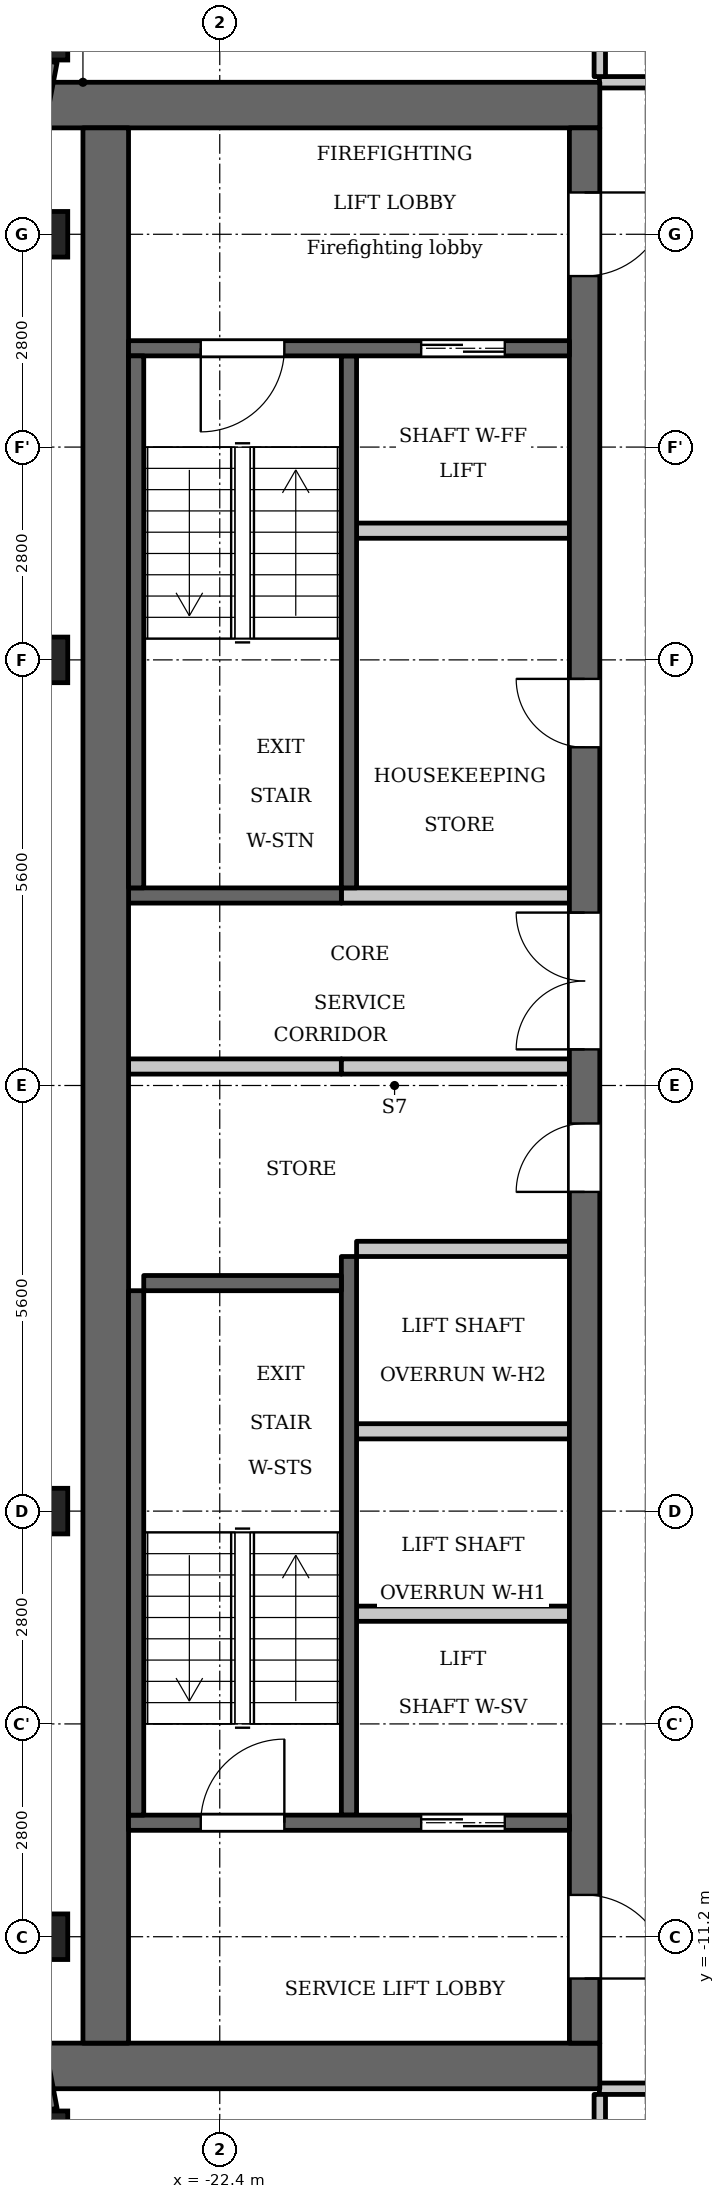
"""IFC4 building model, lengths in metres.
Left out: names, types, materials, properties, quantities, classifications, styles, units other than length and angle.
Written with IfcOpenShell. Run it as: python <this file> out.ifc"""

import sys

from ifc_helpers import new_model, si_unit, direction, frame, frame_2d, origin, origin_2d, place, context, subcontext, project, spatial, rectangle, extrude, element, fill, save


model = new_model("IFC4")
c1 = context("Model", 3, precision=1e-05, world=origin(), true_north=direction((0.0, 1.0)))
c2 = subcontext(c1, "Body", "Model", "MODEL_VIEW")
j1 = project(units=[si_unit("LENGTHUNIT", "METRE"), si_unit("PLANEANGLEUNIT", "RADIAN")], contexts=[c1])
p1 = place(None, origin())
s1 = spatial("IfcSite", under=j1, at=p1, CompositionType="ELEMENT")
p2 = place(p1, origin())
s2 = spatial("IfcBuilding", under=s1, at=p2, CompositionType="ELEMENT")
p3 = place(p2, frame((0.0, 0.0, 299.9)))
s3 = spatial("IfcBuildingStorey", under=s2, at=p3, CompositionType="ELEMENT", Elevation=299.9)
for number, where, z_axis, x_axis in (
    (1, (-24.7, -13.793, 0.0), (0.0, 0.0, 1.0), (1.0, 0.0, 0.0)),
    (2, (-24.7, -11.2, 0.0), (0.0, 0.0, 1.0), (1.0, 0.0, 0.0)),
    (3, (-24.7, -5.6, 0.0), (0.0, 0.0, 1.0), (1.0, 0.0, 0.0)),
    (4, (-24.7, 5.6, 0.0), (0.0, 0.0, 1.0), (1.0, 0.0, 0.0)),
    (5, (-24.7, 11.2, 0.0), (0.0, 0.0, 1.0), (1.0, 0.0, 0.0)),
    (6, (-24.7, 13.793, 0.0), (0.0, 0.0, 1.0), (1.0, 0.0, 0.0)),
):
    element("IfcColumn", number, at=place(p3, frame(where, z_axis=z_axis, x_axis=x_axis)), inside=s3, PredefinedType="COLUMN", context=c2, shape_type="SweptSolid", body=[
        extrude(rectangle(XDim=0.6, YDim=0.6, at=origin_2d()), origin(), (0.0, 0.0, 1.0), 3.5),
    ])
for number, where, z_axis, x_axis in (
    (7, (-24.688, 13.485, 0.0), (0.0, 0.0, 1.0), (-0.187, -0.982, 0.0)),
    (8, (-25.052, -11.573, 0.0), (0.0, 0.0, 1.0), (0.187, -0.982, 0.0)),
):
    element("IfcWall", number, at=place(p3, frame(where, z_axis=z_axis, x_axis=x_axis)), inside=s3, PredefinedType="SOLIDWALL", context=c2, shape_type="SweptSolid", body=[
        extrude(rectangle(XDim=1.947, YDim=0.3, at=frame_2d((0.973, 0.0))), origin(), (0.0, 0.0, 1.0), 2.6),
    ])
p4 = place(p3, frame((-20.7, 2.6, 0.0), z_axis=(0.0, 0.0, 1.0), x_axis=(0.0, 1.0, 0.0)))
e9 = element("IfcWall", 9, at=p4, inside=s3, PredefinedType="SHEAR", context=c2, shape_type="SweptSolid", body=[
    extrude(rectangle(XDim=7.0, YDim=0.2, at=frame_2d((3.5, 0.0))), origin(), (0.0, 0.0, 1.0), 3.2),
])
p5 = place(p3, frame((-20.7, -9.6, 0.0), z_axis=(0.0, 0.0, 1.0), x_axis=(0.0, 1.0, 0.0)))
e10 = element("IfcWall", 10, at=p5, inside=s3, PredefinedType="SHEAR", context=c2, shape_type="SweptSolid", body=[
    extrude(rectangle(XDim=7.35, YDim=0.2, at=frame_2d((3.675, 0.0))), origin(), (0.0, 0.0, 1.0), 3.2),
])
p6 = place(p3, frame((-20.8, 2.5, 0.0), z_axis=(0.0, 0.0, 1.0), x_axis=(-1.0, 0.0, 0.0)))
e11 = element("IfcWall", 11, at=p6, inside=s3, PredefinedType="SHEAR", context=c2, shape_type="SweptSolid", body=[
    extrude(rectangle(XDim=2.8, YDim=0.2, at=frame_2d((1.4, 0.0))), origin(), (0.0, 0.0, 1.0), 3.2),
])
p7 = place(p3, frame((-20.8, 0.25, 0.0), z_axis=(0.0, 0.0, 1.0), x_axis=(-1.0, 0.0, 0.0)))
e12 = element("IfcWall", 12, at=p7, inside=s3, PredefinedType="PARTITIONING", context=c2, shape_type="SweptSolid", body=[
    extrude(rectangle(XDim=2.8, YDim=0.2, at=frame_2d((1.4, 0.0))), origin(), (0.0, 0.0, 1.0), 3.2),
])
for number, where, z_axis, x_axis in (
    (13, (-17.4, 12.9, 0.0), (0.0, 0.0, 1.0), (-1.0, 0.0, 0.0)),
    (14, (-17.4, -12.9, 0.0), (0.0, 0.0, 1.0), (-1.0, 0.0, 0.0)),
):
    element("IfcWall", number, at=place(p3, frame(where, z_axis=z_axis, x_axis=x_axis)), inside=s3, PredefinedType="SHEAR", context=c2, shape_type="SweptSolid", body=[
        extrude(rectangle(XDim=7.6, YDim=0.6, at=frame_2d((3.8, 0.0))), origin(), (0.0, 0.0, 1.0), 3.2),
    ])
p8 = place(p3, frame((-17.6, -12.6, 0.0), z_axis=(0.0, 0.0, 1.0), x_axis=(0.0, 1.0, 0.0)))
e15 = element("IfcWall", 15, at=p8, inside=s3, PredefinedType="SHEAR", context=c2, shape_type="SweptSolid", body=[
    extrude(rectangle(XDim=25.2, YDim=0.4, at=frame_2d((12.6, 0.0))), origin(), (0.0, 0.0, 1.0), 3.2),
])
p9 = place(p8, frame((11.2, 0.0, 0.0)))
e16 = element("IfcOpeningElement", 16, at=p9, cuts=e15, PredefinedType="OPENING", context=c2, shape_type="SweptSolid", body=[
    extrude(rectangle(XDim=0.9, YDim=2.1, at=frame_2d((0.45, 1.05))), frame((0.0, 0.21, 0.0), z_axis=(0.0, -1.0, 0.0), x_axis=(1.0, 0.0, 0.0)), (0.0, 0.0, 1.0), 0.42),
])
p10 = place(p8, frame((17.05, 0.0, 0.0)))
e17 = element("IfcOpeningElement", 17, at=p10, cuts=e15, PredefinedType="OPENING", context=c2, shape_type="SweptSolid", body=[
    extrude(rectangle(XDim=0.9, YDim=2.1, at=frame_2d((0.45, 1.05))), frame((0.0, 0.21, 0.0), z_axis=(0.0, -1.0, 0.0), x_axis=(1.0, 0.0, 0.0)), (0.0, 0.0, 1.0), 0.42),
])
p11 = place(p8, frame((23.25, 0.0, 0.0)))
e18 = element("IfcOpeningElement", 18, at=p11, cuts=e15, PredefinedType="OPENING", context=c2, shape_type="SweptSolid", body=[
    extrude(rectangle(XDim=1.1, YDim=2.1, at=frame_2d((0.55, 1.05))), frame((0.0, 0.21, 0.0), z_axis=(0.0, -1.0, 0.0), x_axis=(1.0, 0.0, 0.0)), (0.0, 0.0, 1.0), 0.42),
])
p12 = place(p8, frame((0.85, 0.0, 0.0)))
e19 = element("IfcOpeningElement", 19, at=p12, cuts=e15, PredefinedType="OPENING", context=c2, shape_type="SweptSolid", body=[
    extrude(rectangle(XDim=1.1, YDim=2.1, at=frame_2d((0.55, 1.05))), frame((0.0, 0.21, 0.0), z_axis=(0.0, -1.0, 0.0), x_axis=(1.0, 0.0, 0.0)), (0.0, 0.0, 1.0), 0.42),
])
p13 = place(p8, frame((13.075, 0.0, 0.0)))
e20 = element("IfcOpeningElement", 20, at=p13, cuts=e15, PredefinedType="OPENING", context=c2, shape_type="SweptSolid", body=[
    extrude(rectangle(XDim=1.8, YDim=2.1, at=frame_2d((0.9, 1.05))), frame((0.0, 0.21, 0.0), z_axis=(0.0, -1.0, 0.0), x_axis=(1.0, 0.0, 0.0)), (0.0, 0.0, 1.0), 0.42),
])
p14 = place(p3, frame((-23.9, -12.6, 0.0), z_axis=(0.0, 0.0, 1.0), x_axis=(0.0, 1.0, 0.0)))
e21 = element("IfcWall", 21, at=p14, inside=s3, PredefinedType="SHEAR", context=c2, shape_type="SweptSolid", body=[
    extrude(rectangle(XDim=25.2, YDim=0.6, at=frame_2d((12.6, 0.0))), origin(), (0.0, 0.0, 1.0), 3.2),
])
p15 = place(p3, frame((-17.8, -9.7, 0.0), z_axis=(0.0, 0.0, 1.0), x_axis=(-1.0, 0.0, 0.0)))
e22 = element("IfcWall", 22, at=p15, inside=s3, PredefinedType="SHEAR", context=c2, shape_type="SweptSolid", body=[
    extrude(rectangle(XDim=5.8, YDim=0.2, at=frame_2d((2.9, 0.0))), origin(), (0.0, 0.0, 1.0), 3.2),
])
p16 = place(p15, frame((0.85, 0.0, 0.0)))
e23 = element("IfcOpeningElement", 23, at=p16, cuts=e22, PredefinedType="OPENING", context=c2, shape_type="SweptSolid", body=[
    extrude(rectangle(XDim=1.1, YDim=2.1, at=frame_2d((0.55, 1.05))), frame((0.0, 0.11, 0.0), z_axis=(0.0, -1.0, 0.0), x_axis=(1.0, 0.0, 0.0)), (0.0, 0.0, 1.0), 0.22),
])
p17 = place(p15, frame((3.75, 0.0, 0.0)))
e24 = element("IfcOpeningElement", 24, at=p17, cuts=e22, PredefinedType="OPENING", context=c2, shape_type="SweptSolid", body=[
    extrude(rectangle(XDim=1.1, YDim=2.1, at=frame_2d((0.55, 1.05))), frame((0.0, 0.11, 0.0), z_axis=(0.0, -1.0, 0.0), x_axis=(1.0, 0.0, 0.0)), (0.0, 0.0, 1.0), 0.22),
])
for number, where, z_axis, x_axis in (
    (25, (-17.8, -6.95, 0.0), (0.0, 0.0, 1.0), (-1.0, 0.0, 0.0)),
    (26, (-17.8, -4.55, 0.0), (0.0, 0.0, 1.0), (-1.0, 0.0, 0.0)),
    (27, (-17.8, -2.15, 0.0), (0.0, 0.0, 1.0), (-1.0, 0.0, 0.0)),
):
    element("IfcWall", number, at=place(p3, frame(where, z_axis=z_axis, x_axis=x_axis)), inside=s3, PredefinedType="PARTITIONING", context=c2, shape_type="SweptSolid", body=[
        extrude(rectangle(XDim=2.8, YDim=0.2, at=frame_2d((1.4, 0.0))), origin(), (0.0, 0.0, 1.0), 3.2),
    ])
for number, where, z_axis, x_axis in (
    (28, (-17.8, 0.25, 0.0), (0.0, 0.0, 1.0), (-1.0, 0.0, 0.0)),
    (29, (-17.8, 2.5, 0.0), (0.0, 0.0, 1.0), (-1.0, 0.0, 0.0)),
):
    element("IfcWall", number, at=place(p3, frame(where, z_axis=z_axis, x_axis=x_axis)), inside=s3, PredefinedType="PARTITIONING", context=c2, shape_type="SweptSolid", body=[
        extrude(rectangle(XDim=3.0, YDim=0.2, at=frame_2d((1.5, 0.0))), origin(), (0.0, 0.0, 1.0), 3.2),
    ])
p18 = place(p3, frame((-17.8, 7.3, 0.0), z_axis=(0.0, 0.0, 1.0), x_axis=(-1.0, 0.0, 0.0)))
e30 = element("IfcWall", 30, at=p18, inside=s3, PredefinedType="PARTITIONING", context=c2, shape_type="SweptSolid", body=[
    extrude(rectangle(XDim=2.8, YDim=0.2, at=frame_2d((1.4, 0.0))), origin(), (0.0, 0.0, 1.0), 3.2),
])
p19 = place(p3, frame((-17.8, 9.7, 0.0), z_axis=(0.0, 0.0, 1.0), x_axis=(-1.0, 0.0, 0.0)))
e31 = element("IfcWall", 31, at=p19, inside=s3, PredefinedType="SHEAR", context=c2, shape_type="SweptSolid", body=[
    extrude(rectangle(XDim=5.8, YDim=0.2, at=frame_2d((2.9, 0.0))), origin(), (0.0, 0.0, 1.0), 3.2),
])
p20 = place(p19, frame((0.85, 0.0, 0.0)))
e32 = element("IfcOpeningElement", 32, at=p20, cuts=e31, PredefinedType="OPENING", context=c2, shape_type="SweptSolid", body=[
    extrude(rectangle(XDim=1.1, YDim=2.1, at=frame_2d((0.55, 1.05))), frame((0.0, 0.11, 0.0), z_axis=(0.0, -1.0, 0.0), x_axis=(1.0, 0.0, 0.0)), (0.0, 0.0, 1.0), 0.22),
])
p21 = place(p19, frame((3.75, 0.0, 0.0)))
e33 = element("IfcOpeningElement", 33, at=p21, cuts=e31, PredefinedType="OPENING", context=c2, shape_type="SweptSolid", body=[
    extrude(rectangle(XDim=1.1, YDim=2.1, at=frame_2d((0.55, 1.05))), frame((0.0, 0.11, 0.0), z_axis=(0.0, -1.0, 0.0), x_axis=(1.0, 0.0, 0.0)), (0.0, 0.0, 1.0), 0.22),
])
p22 = place(p3, frame((-23.5, 2.6, 0.0), z_axis=(0.0, 0.0, 1.0), x_axis=(0.0, 1.0, 0.0)))
e34 = element("IfcWall", 34, at=p22, inside=s3, PredefinedType="SHEAR", context=c2, shape_type="SweptSolid", body=[
    extrude(rectangle(XDim=7.0, YDim=0.2, at=frame_2d((3.5, 0.0))), origin(), (0.0, 0.0, 1.0), 3.2),
])
p23 = place(p3, frame((-23.5, -9.6, 0.0), z_axis=(0.0, 0.0, 1.0), x_axis=(0.0, 1.0, 0.0)))
e35 = element("IfcWall", 35, at=p23, inside=s3, PredefinedType="SHEAR", context=c2, shape_type="SweptSolid", body=[
    extrude(rectangle(XDim=6.9, YDim=0.2, at=frame_2d((3.45, 0.0))), origin(), (0.0, 0.0, 1.0), 3.2),
])
p24 = place(p3, frame((-20.8, -2.6, 0.0), z_axis=(0.0, 0.0, 1.0), x_axis=(-1.0, 0.0, 0.0)))
e36 = element("IfcWall", 36, at=p24, inside=s3, PredefinedType="SHEAR", context=c2, shape_type="SweptSolid", body=[
    extrude(rectangle(XDim=2.6, YDim=0.2, at=frame_2d((1.3, 0.0))), origin(), (0.0, 0.0, 1.0), 3.2),
])
p25 = place(p3, frame((-17.405, -13.2, 0.0), z_axis=(0.0, 0.0, 1.0), x_axis=(1.0, 0.0, 0.0)))
e37 = element("IfcWall", 37, at=p25, inside=s3, PredefinedType="PARTITIONING", context=c2, shape_type="SweptSolid", body=[
    extrude(rectangle(XDim=2.085, YDim=0.15, at=frame_2d((1.042, 0.0))), origin(), (0.0, 0.0, 1.0), 3.2),
])
p26 = place(p25, frame((0.655, 0.0, 0.0)))
e38 = element("IfcOpeningElement", 38, at=p26, cuts=e37, PredefinedType="OPENING", context=c2, shape_type="SweptSolid", body=[
    extrude(rectangle(XDim=1.0, YDim=2.1, at=frame_2d((0.5, 1.05))), frame((0.0, 0.085, 0.0), z_axis=(0.0, -1.0, 0.0), x_axis=(1.0, 0.0, 0.0)), (0.0, 0.0, 1.0), 0.17),
])
p27 = place(p3, frame((-17.405, 13.2, 0.0), z_axis=(0.0, 0.0, 1.0), x_axis=(1.0, 0.0, 0.0)))
e39 = element("IfcWall", 39, at=p27, inside=s3, PredefinedType="PARTITIONING", context=c2, shape_type="SweptSolid", body=[
    extrude(rectangle(XDim=2.085, YDim=0.15, at=frame_2d((1.042, 0.0))), origin(), (0.0, 0.0, 1.0), 3.2),
])
p28 = place(p27, frame((0.665, 0.0, 0.0)))
e40 = element("IfcOpeningElement", 40, at=p28, cuts=e39, PredefinedType="OPENING", context=c2, shape_type="SweptSolid", body=[
    extrude(rectangle(XDim=1.0, YDim=2.1, at=frame_2d((0.5, 1.05))), frame((0.0, 0.085, 0.0), z_axis=(0.0, -1.0, 0.0), x_axis=(1.0, 0.0, 0.0)), (0.0, 0.0, 1.0), 0.17),
])
p29 = place(p3, frame((-17.4, -19.236, 0.0), z_axis=(0.0, 0.0, 1.0), x_axis=(0.0, 1.0, 0.0)))
e41 = element("IfcWall", 41, at=p29, inside=s3, PredefinedType="PARTITIONING", context=c2, shape_type="SweptSolid", body=[
    extrude(rectangle(XDim=5.961, YDim=0.15, at=frame_2d((2.981, 0.0))), origin(), (0.0, 0.0, 1.0), 3.2),
])
p30 = place(p29, frame((0.486, 0.0, 0.0)))
e42 = element("IfcOpeningElement", 42, at=p30, cuts=e41, PredefinedType="OPENING", context=c2, shape_type="SweptSolid", body=[
    extrude(rectangle(XDim=0.9, YDim=2.1, at=frame_2d((0.45, 1.05))), frame((0.0, 0.085, 0.0), z_axis=(0.0, -1.0, 0.0), x_axis=(1.0, 0.0, 0.0)), (0.0, 0.0, 1.0), 0.17),
])
p31 = place(p3, frame((-17.4, 13.275, 0.0), z_axis=(0.0, 0.0, 1.0), x_axis=(0.0, 1.0, 0.0)))
e43 = element("IfcWall", 43, at=p31, inside=s3, PredefinedType="PARTITIONING", context=c2, shape_type="SweptSolid", body=[
    extrude(rectangle(XDim=5.961, YDim=0.15, at=frame_2d((2.981, 0.0))), origin(), (0.0, 0.0, 1.0), 3.2),
])
p32 = place(p31, frame((1.045, 0.0, 0.0)))
e44 = element("IfcOpeningElement", 44, at=p32, cuts=e43, PredefinedType="OPENING", context=c2, shape_type="SweptSolid", body=[
    extrude(rectangle(XDim=1.0, YDim=2.1, at=frame_2d((0.5, 1.05))), frame((0.0, 0.085, 0.0), z_axis=(0.0, -1.0, 0.0), x_axis=(1.0, 0.0, 0.0)), (0.0, 0.0, 1.0), 0.17),
])
p33 = place(p16, origin())
e45 = element("IfcDoor", 45, at=p33, inside=s3, OperationType="DOUBLE_DOOR_SLIDING", PredefinedType="DOOR", context=c2, shape_type="SweptSolid", body=[
    extrude(rectangle(XDim=1.1, YDim=2.1, at=frame_2d((0.55, 1.05))), frame((0.0, 0.025, 0.0), z_axis=(0.0, -1.0, 0.0), x_axis=(1.0, 0.0, 0.0)), (0.0, 0.0, 1.0), 0.05),
])
fill(e23, e45)
p34 = place(p9, origin())
e46 = element("IfcDoor", 46, at=p34, inside=s3, OperationType="SINGLE_SWING_RIGHT", PredefinedType="DOOR", context=c2, shape_type="SweptSolid", body=[
    extrude(rectangle(XDim=0.9, YDim=2.1, at=frame_2d((0.45, 1.05))), frame((0.0, 0.025, 0.0), z_axis=(0.0, -1.0, 0.0), x_axis=(1.0, 0.0, 0.0)), (0.0, 0.0, 1.0), 0.05),
])
fill(e16, e46)
p35 = place(p10, origin())
e47 = element("IfcDoor", 47, at=p35, inside=s3, OperationType="SINGLE_SWING_LEFT", PredefinedType="DOOR", context=c2, shape_type="SweptSolid", body=[
    extrude(rectangle(XDim=0.9, YDim=2.1, at=frame_2d((0.45, 1.05))), frame((0.0, 0.025, 0.0), z_axis=(0.0, -1.0, 0.0), x_axis=(1.0, 0.0, 0.0)), (0.0, 0.0, 1.0), 0.05),
])
fill(e17, e47)
p36 = place(p20, origin())
e48 = element("IfcDoor", 48, at=p36, inside=s3, OperationType="DOUBLE_DOOR_SLIDING", PredefinedType="DOOR", context=c2, shape_type="SweptSolid", body=[
    extrude(rectangle(XDim=1.1, YDim=2.1, at=frame_2d((0.55, 1.05))), frame((0.0, 0.025, 0.0), z_axis=(0.0, -1.0, 0.0), x_axis=(1.0, 0.0, 0.0)), (0.0, 0.0, 1.0), 0.05),
])
fill(e32, e48)
p37 = place(p11, origin())
e49 = element("IfcDoor", 49, at=p37, inside=s3, OperationType="SINGLE_SWING_RIGHT", PredefinedType="DOOR", context=c2, shape_type="SweptSolid", body=[
    extrude(rectangle(XDim=1.1, YDim=2.1, at=frame_2d((0.55, 1.05))), frame((0.0, 0.025, 0.0), z_axis=(0.0, -1.0, 0.0), x_axis=(1.0, 0.0, 0.0)), (0.0, 0.0, 1.0), 0.05),
])
fill(e18, e49)
p38 = place(p12, origin())
e50 = element("IfcDoor", 50, at=p38, inside=s3, OperationType="SINGLE_SWING_LEFT", PredefinedType="DOOR", context=c2, shape_type="SweptSolid", body=[
    extrude(rectangle(XDim=1.1, YDim=2.1, at=frame_2d((0.55, 1.05))), frame((0.0, 0.025, 0.0), z_axis=(0.0, -1.0, 0.0), x_axis=(1.0, 0.0, 0.0)), (0.0, 0.0, 1.0), 0.05),
])
fill(e19, e50)
p39 = place(p21, origin())
e51 = element("IfcDoor", 51, at=p39, inside=s3, OperationType="SINGLE_SWING_LEFT", PredefinedType="DOOR", context=c2, shape_type="SweptSolid", body=[
    extrude(rectangle(XDim=1.1, YDim=2.1, at=frame_2d((0.55, 1.05))), frame((0.0, 0.025, 0.0), z_axis=(0.0, -1.0, 0.0), x_axis=(1.0, 0.0, 0.0)), (0.0, 0.0, 1.0), 0.05),
])
fill(e33, e51)
p40 = place(p17, origin())
e52 = element("IfcDoor", 52, at=p40, inside=s3, OperationType="SINGLE_SWING_LEFT", PredefinedType="DOOR", context=c2, shape_type="SweptSolid", body=[
    extrude(rectangle(XDim=1.1, YDim=2.1, at=frame_2d((0.55, 1.05))), frame((0.0, 0.025, 0.0), z_axis=(0.0, -1.0, 0.0), x_axis=(1.0, 0.0, 0.0)), (0.0, 0.0, 1.0), 0.05),
])
fill(e24, e52)
p41 = place(p13, origin())
e53 = element("IfcDoor", 53, at=p41, inside=s3, OperationType="DOUBLE_DOOR_SINGLE_SWING", PredefinedType="DOOR", context=c2, shape_type="SweptSolid", body=[
    extrude(rectangle(XDim=1.8, YDim=2.1, at=frame_2d((0.9, 1.05))), frame((0.0, 0.025, 0.0), z_axis=(0.0, -1.0, 0.0), x_axis=(1.0, 0.0, 0.0)), (0.0, 0.0, 1.0), 0.05),
])
fill(e20, e53)
save(model, sys.argv[1])
